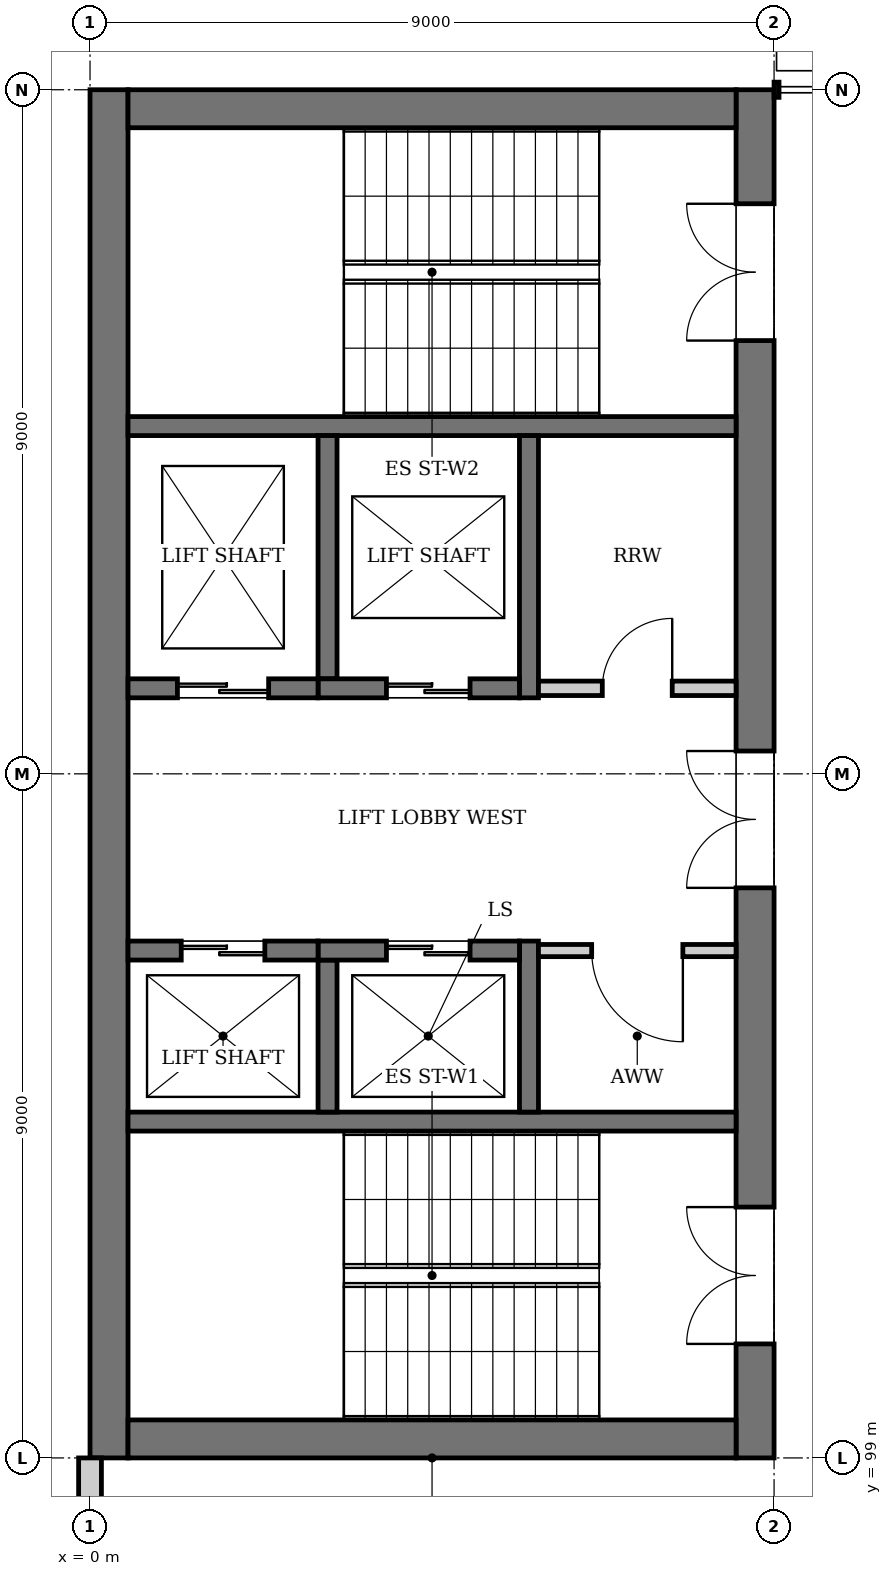
"""IFC4 building model, lengths in metres.
Left out: names, types, materials, properties, quantities, classifications, styles, units other than length and angle.
Written with IfcOpenShell. Run it as: python <this file> out.ifc"""

import sys

from ifc_helpers import new_model, si_unit, direction, frame, frame_2d, origin, place, context, subcontext, project, spatial, rectangle, extrude, element, fill, save


model = new_model("IFC4")
c1 = context("Model", 3, precision=1e-05, world=origin(), true_north=direction((0.0, 1.0)))
c2 = subcontext(c1, "Body", "Model", "MODEL_VIEW")
j1 = project(units=[si_unit("LENGTHUNIT", "METRE"), si_unit("PLANEANGLEUNIT", "RADIAN")], contexts=[c1])
p1 = place(None, origin())
s1 = spatial("IfcSite", under=j1, at=p1, CompositionType="ELEMENT")
p2 = place(p1, origin())
s2 = spatial("IfcBuilding", under=s1, at=p2, CompositionType="ELEMENT")
p3 = place(p2, frame((0.0, 0.0, 10.5)))
s3 = spatial("IfcBuildingStorey", under=s2, at=p3, CompositionType="ELEMENT", Elevation=10.5)
p4 = place(p3, frame((0.25, 99.0, 0.0), z_axis=(0.0, 0.0, 1.0), x_axis=(0.0, 1.0, 0.0)))
e1 = element("IfcWall", 1, at=p4, inside=s3, PredefinedType="SHEAR", context=c2, shape_type="SweptSolid", body=[
    extrude(rectangle(XDim=18.0, YDim=0.5, at=frame_2d((9.0, 0.0))), origin(), (0.0, 0.0, 1.0), 4.5),
])
p5 = place(p3, frame((8.75, 99.0, 0.0), z_axis=(0.0, 0.0, 1.0), x_axis=(0.0, 1.0, 0.0)))
e2 = element("IfcWall", 2, at=p5, inside=s3, PredefinedType="SHEAR", context=c2, shape_type="SweptSolid", body=[
    extrude(rectangle(XDim=18.0, YDim=0.5, at=frame_2d((9.0, 0.0))), origin(), (0.0, 0.0, 1.0), 4.5),
])
p6 = place(p5, frame((1.5, 0.0, 0.0)))
e3 = element("IfcOpeningElement", 3, at=p6, cuts=e2, PredefinedType="OPENING", context=c2, shape_type="SweptSolid", body=[
    extrude(rectangle(XDim=1.8, YDim=2.1, at=frame_2d((0.9, 1.05))), frame((0.0, 0.26, 0.0), z_axis=(0.0, -1.0, 0.0), x_axis=(1.0, 0.0, 0.0)), (0.0, 0.0, 1.0), 0.52),
])
p7 = place(p5, frame((14.7, 0.0, 0.0)))
e4 = element("IfcOpeningElement", 4, at=p7, cuts=e2, PredefinedType="OPENING", context=c2, shape_type="SweptSolid", body=[
    extrude(rectangle(XDim=1.8, YDim=2.1, at=frame_2d((0.9, 1.05))), frame((0.0, 0.26, 0.0), z_axis=(0.0, -1.0, 0.0), x_axis=(1.0, 0.0, 0.0)), (0.0, 0.0, 1.0), 0.52),
])
p8 = place(p5, frame((7.5, 0.0, 0.0)))
e5 = element("IfcOpeningElement", 5, at=p8, cuts=e2, PredefinedType="OPENING", context=c2, shape_type="SweptSolid", body=[
    extrude(rectangle(XDim=1.8, YDim=2.1, at=frame_2d((0.9, 1.05))), frame((0.0, 0.26, 0.0), z_axis=(0.0, -1.0, 0.0), x_axis=(1.0, 0.0, 0.0)), (0.0, 0.0, 1.0), 0.52),
])
for number, where, z_axis, x_axis in (
    (6, (0.5, 99.25, 0.0), (0.0, 0.0, 1.0), (1.0, 0.0, 0.0)),
    (7, (0.5, 116.75, 0.0), (0.0, 0.0, 1.0), (1.0, 0.0, 0.0)),
):
    element("IfcWall", number, at=place(p3, frame(where, z_axis=z_axis, x_axis=x_axis)), inside=s3, PredefinedType="SHEAR", context=c2, shape_type="SweptSolid", body=[
        extrude(rectangle(XDim=8.0, YDim=0.5, at=frame_2d((4.0, 0.0))), origin(), (0.0, 0.0, 1.0), 4.5),
    ])
p9 = place(p3, frame((0.0, 90.127, 0.0), z_axis=(0.0, 0.0, 1.0), x_axis=(0.0, 1.0, 0.0)))
e8 = element("IfcWall", 8, at=p9, inside=s3, PredefinedType="SOLIDWALL", context=c2, shape_type="SweptSolid", body=[
    extrude(rectangle(XDim=8.873, YDim=0.3, at=frame_2d((4.437, 0.0))), origin(), (0.0, 0.0, 1.0), 3.991),
])
p10 = place(p9, frame((1.223, 0.0, 0.9)))
e9 = element("IfcOpeningElement", 9, at=p10, cuts=e8, PredefinedType="OPENING", context=c2, shape_type="SweptSolid", body=[
    extrude(rectangle(XDim=1.8, YDim=2.4, at=frame_2d((0.9, 1.2))), frame((0.0, 0.16, 0.0), z_axis=(0.0, -1.0, 0.0), x_axis=(1.0, 0.0, 0.0)), (0.0, 0.0, 1.0), 0.32),
])
p11 = place(p9, frame((6.173, 0.0, 0.6)))
e10 = element("IfcOpeningElement", 10, at=p11, cuts=e8, PredefinedType="OPENING", context=c2, shape_type="SweptSolid", body=[
    extrude(rectangle(XDim=0.9, YDim=2.7, at=frame_2d((0.45, 1.35))), frame((0.0, 0.16, 0.0), z_axis=(0.0, -1.0, 0.0), x_axis=(1.0, 0.0, 0.0)), (0.0, 0.0, 1.0), 0.32),
])
for number, where, z_axis, x_axis in (
    (11, (8.5, 103.425, 0.0), (0.0, 0.0, 1.0), (-1.0, 0.0, 0.0)),
    (12, (8.5, 112.575, 0.0), (0.0, 0.0, 1.0), (-1.0, 0.0, 0.0)),
):
    element("IfcWall", number, at=place(p3, frame(where, z_axis=z_axis, x_axis=x_axis)), inside=s3, PredefinedType="SOLIDWALL", context=c2, shape_type="SweptSolid", body=[
        extrude(rectangle(XDim=8.0, YDim=0.25, at=frame_2d((4.0, 0.0))), origin(), (0.0, 0.0, 1.0), 4.25),
    ])
p12 = place(p3, frame((5.775, 103.55, 0.0), z_axis=(0.0, 0.0, 1.0), x_axis=(0.0, 1.0, 0.0)))
e13 = element("IfcWall", 13, at=p12, inside=s3, PredefinedType="SOLIDWALL", context=c2, shape_type="SweptSolid", body=[
    extrude(rectangle(XDim=2.25, YDim=0.25, at=frame_2d((1.125, 0.0))), origin(), (0.0, 0.0, 1.0), 4.5),
])
p13 = place(p3, frame((3.125, 103.55, 0.0), z_axis=(0.0, 0.0, 1.0), x_axis=(0.0, 1.0, 0.0)))
e14 = element("IfcWall", 14, at=p13, inside=s3, PredefinedType="SOLIDWALL", context=c2, shape_type="SweptSolid", body=[
    extrude(rectangle(XDim=2.0, YDim=0.25, at=frame_2d((1.0, 0.0))), origin(), (0.0, 0.0, 1.0), 4.5),
])
p14 = place(p3, frame((5.65, 105.675, 0.0), z_axis=(0.0, 0.0, 1.0), x_axis=(-1.0, 0.0, 0.0)))
e15 = element("IfcWall", 15, at=p14, inside=s3, PredefinedType="SOLIDWALL", context=c2, shape_type="SweptSolid", body=[
    extrude(rectangle(XDim=2.65, YDim=0.25, at=frame_2d((1.325, 0.0))), origin(), (0.0, 0.0, 1.0), 4.5),
])
p15 = place(p14, frame((0.65, 0.0, 0.0)))
e16 = element("IfcOpeningElement", 16, at=p15, cuts=e15, PredefinedType="OPENING", context=c2, shape_type="SweptSolid", body=[
    extrude(rectangle(XDim=1.1, YDim=2.1, at=frame_2d((0.55, 1.05))), frame((0.0, 0.135, 0.0), z_axis=(0.0, -1.0, 0.0), x_axis=(1.0, 0.0, 0.0)), (0.0, 0.0, 1.0), 0.27),
])
p16 = place(p3, frame((3.0, 105.675, 0.0), z_axis=(0.0, 0.0, 1.0), x_axis=(-1.0, 0.0, 0.0)))
e17 = element("IfcWall", 17, at=p16, inside=s3, PredefinedType="SOLIDWALL", context=c2, shape_type="SweptSolid", body=[
    extrude(rectangle(XDim=2.5, YDim=0.25, at=frame_2d((1.25, 0.0))), origin(), (0.0, 0.0, 1.0), 4.5),
])
p17 = place(p16, frame((0.7, 0.0, 0.0)))
e18 = element("IfcOpeningElement", 18, at=p17, cuts=e17, PredefinedType="OPENING", context=c2, shape_type="SweptSolid", body=[
    extrude(rectangle(XDim=1.1, YDim=2.1, at=frame_2d((0.55, 1.05))), frame((0.0, 0.135, 0.0), z_axis=(0.0, -1.0, 0.0), x_axis=(1.0, 0.0, 0.0)), (0.0, 0.0, 1.0), 0.27),
])
p18 = place(p3, frame((5.775, 109.0, 0.0), z_axis=(0.0, 0.0, 1.0), x_axis=(0.0, 1.0, 0.0)))
e19 = element("IfcWall", 19, at=p18, inside=s3, PredefinedType="SOLIDWALL", context=c2, shape_type="SweptSolid", body=[
    extrude(rectangle(XDim=3.45, YDim=0.25, at=frame_2d((1.725, 0.0))), origin(), (0.0, 0.0, 1.0), 4.5),
])
p19 = place(p3, frame((3.125, 109.25, 0.0), z_axis=(0.0, 0.0, 1.0), x_axis=(0.0, 1.0, 0.0)))
e20 = element("IfcWall", 20, at=p19, inside=s3, PredefinedType="SOLIDWALL", context=c2, shape_type="SweptSolid", body=[
    extrude(rectangle(XDim=3.2, YDim=0.25, at=frame_2d((1.6, 0.0))), origin(), (0.0, 0.0, 1.0), 4.5),
])
p20 = place(p3, frame((5.65, 109.125, 0.0), z_axis=(0.0, 0.0, 1.0), x_axis=(-1.0, 0.0, 0.0)))
e21 = element("IfcWall", 21, at=p20, inside=s3, PredefinedType="SOLIDWALL", context=c2, shape_type="SweptSolid", body=[
    extrude(rectangle(XDim=2.65, YDim=0.25, at=frame_2d((1.325, 0.0))), origin(), (0.0, 0.0, 1.0), 4.5),
])
p21 = place(p20, frame((0.65, 0.0, 0.0)))
e22 = element("IfcOpeningElement", 22, at=p21, cuts=e21, PredefinedType="OPENING", context=c2, shape_type="SweptSolid", body=[
    extrude(rectangle(XDim=1.1, YDim=2.1, at=frame_2d((0.55, 1.05))), frame((0.0, 0.135, 0.0), z_axis=(0.0, -1.0, 0.0), x_axis=(1.0, 0.0, 0.0)), (0.0, 0.0, 1.0), 0.27),
])
p22 = place(p3, frame((3.0, 109.125, 0.0), z_axis=(0.0, 0.0, 1.0), x_axis=(-1.0, 0.0, 0.0)))
e23 = element("IfcWall", 23, at=p22, inside=s3, PredefinedType="SOLIDWALL", context=c2, shape_type="SweptSolid", body=[
    extrude(rectangle(XDim=2.5, YDim=0.25, at=frame_2d((1.25, 0.0))), origin(), (0.0, 0.0, 1.0), 4.5),
])
p23 = place(p22, frame((0.65, 0.0, 0.0)))
e24 = element("IfcOpeningElement", 24, at=p23, cuts=e23, PredefinedType="OPENING", context=c2, shape_type="SweptSolid", body=[
    extrude(rectangle(XDim=1.2, YDim=2.1, at=frame_2d((0.6, 1.05))), frame((0.0, 0.135, 0.0), z_axis=(0.0, -1.0, 0.0), x_axis=(1.0, 0.0, 0.0)), (0.0, 0.0, 1.0), 0.27),
])
p24 = place(p3, frame((8.5, 105.675, 0.0), z_axis=(0.0, 0.0, 1.0), x_axis=(-1.0, 0.0, 0.0)))
e25 = element("IfcWall", 25, at=p24, inside=s3, PredefinedType="PARTITIONING", context=c2, shape_type="SweptSolid", body=[
    extrude(rectangle(XDim=2.6, YDim=0.16, at=frame_2d((1.3, 0.0))), origin(), (0.0, 0.0, 1.0), 4.25),
])
p25 = place(p24, frame((0.7, 0.0, 0.0)))
e26 = element("IfcOpeningElement", 26, at=p25, cuts=e25, PredefinedType="OPENING", context=c2, shape_type="SweptSolid", body=[
    extrude(rectangle(XDim=1.2, YDim=2.1, at=frame_2d((0.6, 1.05))), frame((0.0, 0.09, 0.0), z_axis=(0.0, -1.0, 0.0), x_axis=(1.0, 0.0, 0.0)), (0.0, 0.0, 1.0), 0.18),
])
p26 = place(p3, frame((8.5, 109.125, 0.0), z_axis=(0.0, 0.0, 1.0), x_axis=(-1.0, 0.0, 0.0)))
e27 = element("IfcWall", 27, at=p26, inside=s3, PredefinedType="PARTITIONING", context=c2, shape_type="SweptSolid", body=[
    extrude(rectangle(XDim=2.6, YDim=0.19, at=frame_2d((1.3, 0.0))), origin(), (0.0, 0.0, 1.0), 4.25),
])
p27 = place(p26, frame((0.84, 0.0, 0.0)))
e28 = element("IfcOpeningElement", 28, at=p27, cuts=e27, PredefinedType="OPENING", context=c2, shape_type="SweptSolid", body=[
    extrude(rectangle(XDim=0.92, YDim=2.1, at=frame_2d((0.46, 1.05))), frame((0.0, 0.105, 0.0), z_axis=(0.0, -1.0, 0.0), x_axis=(1.0, 0.0, 0.0)), (0.0, 0.0, 1.0), 0.21),
])
p28 = place(p15, origin())
e29 = element("IfcDoor", 29, at=p28, inside=s3, OperationType="DOUBLE_DOOR_SLIDING", PredefinedType="DOOR", context=c2, shape_type="SweptSolid", body=[
    extrude(rectangle(XDim=1.1, YDim=2.1, at=frame_2d((0.55, 1.05))), frame((0.0, 0.025, 0.0), z_axis=(0.0, -1.0, 0.0), x_axis=(1.0, 0.0, 0.0)), (0.0, 0.0, 1.0), 0.05),
])
fill(e16, e29)
p29 = place(p17, origin())
e30 = element("IfcDoor", 30, at=p29, inside=s3, OperationType="DOUBLE_DOOR_SLIDING", PredefinedType="DOOR", context=c2, shape_type="SweptSolid", body=[
    extrude(rectangle(XDim=1.1, YDim=2.1, at=frame_2d((0.55, 1.05))), frame((0.0, 0.025, 0.0), z_axis=(0.0, -1.0, 0.0), x_axis=(1.0, 0.0, 0.0)), (0.0, 0.0, 1.0), 0.05),
])
fill(e18, e30)
p30 = place(p21, origin())
e31 = element("IfcDoor", 31, at=p30, inside=s3, OperationType="DOUBLE_DOOR_SLIDING", PredefinedType="DOOR", context=c2, shape_type="SweptSolid", body=[
    extrude(rectangle(XDim=1.1, YDim=2.1, at=frame_2d((0.55, 1.05))), frame((0.0, 0.025, 0.0), z_axis=(0.0, -1.0, 0.0), x_axis=(1.0, 0.0, 0.0)), (0.0, 0.0, 1.0), 0.05),
])
fill(e22, e31)
p31 = place(p23, origin())
e32 = element("IfcDoor", 32, at=p31, inside=s3, OperationType="DOUBLE_DOOR_SLIDING", PredefinedType="DOOR", context=c2, shape_type="SweptSolid", body=[
    extrude(rectangle(XDim=1.2, YDim=2.1, at=frame_2d((0.6, 1.05))), frame((0.0, 0.025, 0.0), z_axis=(0.0, -1.0, 0.0), x_axis=(1.0, 0.0, 0.0)), (0.0, 0.0, 1.0), 0.05),
])
fill(e24, e32)
p32 = place(p6, origin())
e33 = element("IfcDoor", 33, at=p32, inside=s3, OperationType="DOUBLE_DOOR_SINGLE_SWING", PredefinedType="DOOR", context=c2, shape_type="SweptSolid", body=[
    extrude(rectangle(XDim=1.8, YDim=2.1, at=frame_2d((0.9, 1.05))), frame((0.0, 0.025, 0.0), z_axis=(0.0, -1.0, 0.0), x_axis=(1.0, 0.0, 0.0)), (0.0, 0.0, 1.0), 0.05),
])
fill(e3, e33)
p33 = place(p7, origin())
e34 = element("IfcDoor", 34, at=p33, inside=s3, OperationType="DOUBLE_DOOR_SINGLE_SWING", PredefinedType="DOOR", context=c2, shape_type="SweptSolid", body=[
    extrude(rectangle(XDim=1.8, YDim=2.1, at=frame_2d((0.9, 1.05))), frame((0.0, 0.025, 0.0), z_axis=(0.0, -1.0, 0.0), x_axis=(1.0, 0.0, 0.0)), (0.0, 0.0, 1.0), 0.05),
])
fill(e4, e34)
p34 = place(p8, origin())
e35 = element("IfcDoor", 35, at=p34, inside=s3, OperationType="DOUBLE_DOOR_SINGLE_SWING", PredefinedType="DOOR", context=c2, shape_type="SweptSolid", body=[
    extrude(rectangle(XDim=1.8, YDim=2.1, at=frame_2d((0.9, 1.05))), frame((0.0, 0.025, 0.0), z_axis=(0.0, -1.0, 0.0), x_axis=(1.0, 0.0, 0.0)), (0.0, 0.0, 1.0), 0.05),
])
fill(e5, e35)
p35 = place(p25, origin())
e36 = element("IfcDoor", 36, at=p35, inside=s3, OperationType="SINGLE_SWING_LEFT", PredefinedType="DOOR", context=c2, shape_type="SweptSolid", body=[
    extrude(rectangle(XDim=1.2, YDim=2.1, at=frame_2d((0.6, 1.05))), frame((0.0, 0.025, 0.0), z_axis=(0.0, -1.0, 0.0), x_axis=(1.0, 0.0, 0.0)), (0.0, 0.0, 1.0), 0.05),
])
fill(e26, e36)
p36 = place(p27, frame((0.92, 0.0, 0.0), z_axis=(0.0, 0.0, 1.0), x_axis=(-1.0, 0.0, 0.0)))
e37 = element("IfcDoor", 37, at=p36, inside=s3, OperationType="SINGLE_SWING_RIGHT", PredefinedType="DOOR", context=c2, shape_type="SweptSolid", body=[
    extrude(rectangle(XDim=0.92, YDim=2.1, at=frame_2d((0.46, 1.05))), frame((0.0, 0.025, 0.0), z_axis=(0.0, -1.0, 0.0), x_axis=(1.0, 0.0, 0.0)), (0.0, 0.0, 1.0), 0.05),
])
fill(e28, e37)
save(model, sys.argv[1])
